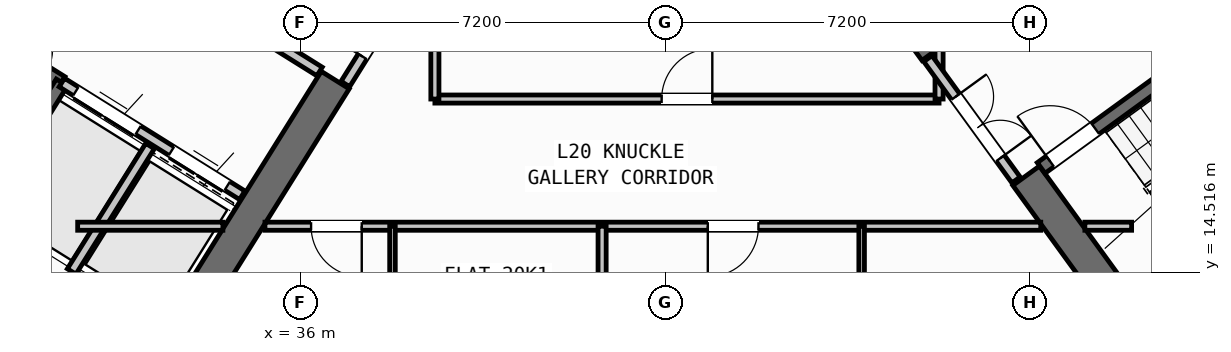
"""IFC4 building model, lengths in metres.
Left out: names, types, materials, properties, quantities, classifications, styles, units other than length and angle.
Written with IfcOpenShell. Run it as: python <this file> out.ifc"""

import sys

from ifc_helpers import new_model, si_unit, direction, frame, frame_2d, origin, place, context, subcontext, project, spatial, rectangle, extrude, source, transform, mapped, element, fill, save


model = new_model("IFC4")
c1 = context("Model", 3, precision=1e-05, world=origin(), true_north=direction((0.0, 1.0)))
c2 = subcontext(c1, "Body", "Model", "MODEL_VIEW")
j1 = project(units=[si_unit("LENGTHUNIT", "METRE"), si_unit("PLANEANGLEUNIT", "RADIAN")], contexts=[c1])
p1 = place(None, origin())
s1 = spatial("IfcSite", under=j1, at=p1, CompositionType="ELEMENT")
p2 = place(p1, origin())
s2 = spatial("IfcBuilding", under=s1, at=p2, CompositionType="ELEMENT")
p3 = place(p2, frame((0.0, 0.0, 81.0)))
s3 = spatial("IfcBuildingStorey", under=s2, at=p3, CompositionType="ELEMENT", Elevation=81.0)
p4 = place(p3, frame((33.409, 12.45, 0.0), z_axis=(0.0, 0.0, 1.0), x_axis=(-0.848051132073, 0.529914405721, 0.0)))
e1 = element("IfcWall", 1, at=p4, inside=s3, PredefinedType="SHEAR", context=c2, shape_type="SweptSolid", body=[
    extrude(rectangle(XDim=13.24, YDim=0.65, at=frame_2d((6.62, 0.0))), origin(), (0.0, 0.0, 1.0), 3.32),
])
p5 = place(p3, frame((36.683, 18.304, 0.0), z_axis=(0.0, 0.0, 1.0), x_axis=(-0.529899109053, -0.848060690178, 0.0)))
e2 = element("IfcWall", 2, at=p5, inside=s3, PredefinedType="SHEAR", context=c2, shape_type="SweptSolid", body=[
    extrude(rectangle(XDim=6.375, YDim=0.65, at=frame_2d((3.188, 0.0))), origin(), (0.0, 0.0, 1.0), 3.32),
])
p6 = place(p3, frame((52.318, 13.11, 0.0), z_axis=(0.0, 0.0, 1.0), x_axis=(0.809019445368, 0.587781878776, 0.0)))
e3 = element("IfcWall", 3, at=p6, inside=s3, PredefinedType="SHEAR", context=c2, shape_type="SweptSolid", body=[
    extrude(rectangle(XDim=12.44, YDim=0.65, at=frame_2d((6.22, 0.0))), origin(), (0.0, 0.0, 1.0), 3.32),
])
p7 = place(p3, frame((52.39, 13.564, 0.0), z_axis=(0.0, 0.0, 1.0), x_axis=(-0.58779688989, 0.809008539037, 0.0)))
e4 = element("IfcWall", 4, at=p7, inside=s3, PredefinedType="SHEAR", context=c2, shape_type="SweptSolid", body=[
    extrude(rectangle(XDim=3.525, YDim=0.65, at=frame_2d((1.763, 0.0))), origin(), (0.0, 0.0, 1.0), 3.32),
])
p8 = place(p3, frame((48.526, 18.884, 0.0), z_axis=(0.0, 0.0, 1.0), x_axis=(-0.58777996584, 0.809020835181, 0.0)))
e5 = element("IfcWall", 5, at=p8, inside=s3, PredefinedType="SHEAR", context=c2, shape_type="SweptSolid", body=[
    extrude(rectangle(XDim=6.375, YDim=0.65, at=frame_2d((3.188, 0.0))), origin(), (0.0, 0.0, 1.0), 3.32),
])
p9 = place(p3, frame((31.76, 12.183, 0.0), z_axis=(0.0, 0.0, 1.0), x_axis=(-0.848047074256, 0.529920899612, 0.0)))
e6 = element("IfcWall", 6, at=p9, inside=s3, PredefinedType="STANDARD", context=c2, shape_type="SweptSolid", body=[
    extrude(rectangle(XDim=30.652, YDim=0.32, at=frame_2d((15.326, 0.0))), origin(), (0.0, 0.0, 1.0), 3.32),
])
p10 = place(p9, frame((14.878, 0.0, 0.0)))
e7 = element("IfcOpeningElement", 7, at=p10, cuts=e6, PredefinedType="OPENING", context=c2, shape_type="SweptSolid", body=[
    extrude(rectangle(XDim=1.2, YDim=2.15, at=frame_2d((0.6, 1.075))), frame((0.0, 0.17, 0.0), z_axis=(0.0, -1.0, 0.0), x_axis=(1.0, 0.0, 0.0)), (0.0, 0.0, 1.0), 0.34),
])
p11 = place(p9, frame((1.99, 0.0, 0.8)))
e8 = element("IfcOpeningElement", 8, at=p11, cuts=e6, PredefinedType="OPENING", context=c2, shape_type="SweptSolid", body=[
    extrude(rectangle(XDim=2.1, YDim=1.55, at=frame_2d((1.05, 0.775))), frame((0.0, 0.17, 0.0), z_axis=(0.0, -1.0, 0.0), x_axis=(1.0, 0.0, 0.0)), (0.0, 0.0, 1.0), 0.34),
])
p12 = place(p9, frame((7.169, 0.0, 0.8)))
e9 = element("IfcOpeningElement", 9, at=p12, cuts=e6, PredefinedType="OPENING", context=c2, shape_type="SweptSolid", body=[
    extrude(rectangle(XDim=2.1, YDim=1.55, at=frame_2d((1.05, 0.775))), frame((0.0, 0.17, 0.0), z_axis=(0.0, -1.0, 0.0), x_axis=(1.0, 0.0, 0.0)), (0.0, 0.0, 1.0), 0.34),
])
p13 = place(p9, frame((21.289, 0.0, 0.85)))
e10 = element("IfcOpeningElement", 10, at=p13, cuts=e6, PredefinedType="OPENING", context=c2, shape_type="SweptSolid", body=[
    extrude(rectangle(XDim=1.5, YDim=1.5, at=frame_2d((0.75, 0.75))), frame((0.0, 0.17, 0.0), z_axis=(0.0, -1.0, 0.0), x_axis=(1.0, 0.0, 0.0)), (0.0, 0.0, 1.0), 0.34),
])
p14 = place(p9, frame((25.59, 0.0, 1.0)))
e11 = element("IfcOpeningElement", 11, at=p14, cuts=e6, PredefinedType="OPENING", context=c2, shape_type="SweptSolid", body=[
    extrude(rectangle(XDim=0.9, YDim=1.25, at=frame_2d((0.45, 0.625))), frame((0.0, 0.17, 0.0), z_axis=(0.0, -1.0, 0.0), x_axis=(1.0, 0.0, 0.0)), (0.0, 0.0, 1.0), 0.34),
])
p15 = place(p9, frame((28.47, 0.0, 1.0)))
e12 = element("IfcOpeningElement", 12, at=p15, cuts=e6, PredefinedType="OPENING", context=c2, shape_type="SweptSolid", body=[
    extrude(rectangle(XDim=0.9, YDim=1.25, at=frame_2d((0.45, 0.625))), frame((0.0, 0.17, 0.0), z_axis=(0.0, -1.0, 0.0), x_axis=(1.0, 0.0, 0.0)), (0.0, 0.0, 1.0), 0.34),
])
p16 = place(p3, frame((31.28, 18.261, 0.0), z_axis=(0.0, 0.0, 1.0), x_axis=(-0.848051618787, 0.529913626805, 0.0)))
e13 = element("IfcWall", 13, at=p16, inside=s3, PredefinedType="SHEAR", context=c2, shape_type="SweptSolid", body=[
    extrude(rectangle(XDim=7.46, YDim=0.26, at=frame_2d((3.73, 0.0))), origin(), (0.0, 0.0, 1.0), 3.32),
])
p17 = place(p16, frame((0.36, 0.0, 0.0)))
e14 = element("IfcOpeningElement", 14, at=p17, cuts=e13, PredefinedType="OPENING", context=c2, shape_type="SweptSolid", body=[
    extrude(rectangle(XDim=0.86, YDim=2.05, at=frame_2d((0.43, 1.025))), frame((0.0, 0.14, 0.0), z_axis=(0.0, -1.0, 0.0), x_axis=(1.0, 0.0, 0.0)), (0.0, 0.0, 1.0), 0.28),
])
p18 = place(p3, frame((31.288, 18.256, 0.0), z_axis=(0.0, 0.0, 1.0), x_axis=(-0.529943379326, -0.848033026897, 0.0)))
e15 = element("IfcWall", 15, at=p18, inside=s3, PredefinedType="SHEAR", context=c2, shape_type="SweptSolid", body=[
    extrude(rectangle(XDim=3.16, YDim=0.26, at=frame_2d((1.58, 0.0))), origin(), (0.0, 0.0, 1.0), 3.32),
])
p19 = place(p3, frame((34.848, 16.031, 0.0), z_axis=(0.0, 0.0, 1.0), x_axis=(-0.848044042236, 0.529925751807, 0.0)))
e16 = element("IfcWall", 16, at=p19, inside=s3, PredefinedType="STANDARD", context=c2, shape_type="SweptSolid", body=[
    extrude(rectangle(XDim=4.198, YDim=0.2, at=frame_2d((2.099, 0.0))), origin(), (0.0, 0.0, 1.0), 3.31),
])
p20 = place(p19, frame((0.348, 0.0, 0.0)))
e17 = element("IfcOpeningElement", 17, at=p20, cuts=e16, PredefinedType="OPENING", context=c2, shape_type="SweptSolid", body=[
    extrude(rectangle(XDim=1.3, YDim=2.2, at=frame_2d((0.65, 1.1))), frame((0.0, 0.11, 0.0), z_axis=(0.0, -1.0, 0.0), x_axis=(1.0, 0.0, 0.0)), (0.0, 0.0, 1.0), 0.22),
])
p21 = place(p19, frame((2.423, 0.0, 0.0)))
e18 = element("IfcOpeningElement", 18, at=p21, cuts=e16, PredefinedType="OPENING", context=c2, shape_type="SweptSolid", body=[
    extrude(rectangle(XDim=1.45, YDim=2.25, at=frame_2d((0.725, 1.125))), frame((0.0, 0.11, 0.0), z_axis=(0.0, -1.0, 0.0), x_axis=(1.0, 0.0, 0.0)), (0.0, 0.0, 1.0), 0.22),
])
p22 = place(p3, frame((36.374, 18.474, 0.0), z_axis=(0.0, 0.0, 1.0), x_axis=(-0.848051071577, 0.529914502535, 0.0)))
e19 = element("IfcWall", 19, at=p22, inside=s3, PredefinedType="STANDARD", context=c2, shape_type="SweptSolid", body=[
    extrude(rectangle(XDim=5.718, YDim=0.2, at=frame_2d((2.859, 0.0))), origin(), (0.0, 0.0, 1.0), 3.31),
])
p23 = place(p22, frame((2.498, 0.0, 0.0)))
e20 = element("IfcOpeningElement", 20, at=p23, cuts=e19, PredefinedType="OPENING", context=c2, shape_type="SweptSolid", body=[
    extrude(rectangle(XDim=1.15, YDim=2.1, at=frame_2d((0.575, 1.05))), frame((0.0, 0.11, 0.0), z_axis=(0.0, -1.0, 0.0), x_axis=(1.0, 0.0, 0.0)), (0.0, 0.0, 1.0), 0.22),
])
p24 = place(p3, frame((33.029, 17.003, 0.0), z_axis=(0.0, 0.0, 1.0), x_axis=(-0.529916267533, -0.848049968695, 0.0)))
e21 = element("IfcWall", 21, at=p24, inside=s3, PredefinedType="STANDARD", context=c2, shape_type="SweptSolid", body=[
    extrude(rectangle(XDim=2.92, YDim=0.2, at=frame_2d((1.46, 0.0))), origin(), (0.0, 0.0, 1.0), 3.31),
])
p25 = place(p3, frame((52.472, 14.013, 0.0), z_axis=(0.0, 0.0, 1.0), x_axis=(0.809028366311, 0.587769599847, 0.0)))
e22 = element("IfcWall", 22, at=p25, inside=s3, PredefinedType="SHEAR", context=c2, shape_type="SweptSolid", body=[
    extrude(rectangle(XDim=7.33, YDim=0.26, at=frame_2d((3.665, 0.0))), origin(), (0.0, 0.0, 1.0), 3.32),
])
p26 = place(p3, frame((50.615, 16.57, 0.0), z_axis=(0.0, 0.0, 1.0), x_axis=(0.809028366311, 0.587769599847, 0.0)))
e23 = element("IfcWall", 23, at=p26, inside=s3, PredefinedType="SHEAR", context=c2, shape_type="SweptSolid", body=[
    extrude(rectangle(XDim=7.33, YDim=0.26, at=frame_2d((3.665, 0.0))), origin(), (0.0, 0.0, 1.0), 3.32),
])
p27 = place(p26, frame((0.22, 0.0, 0.0)))
e24 = element("IfcOpeningElement", 24, at=p27, cuts=e23, PredefinedType="OPENING", context=c2, shape_type="SweptSolid", body=[
    extrude(rectangle(XDim=1.1, YDim=2.1, at=frame_2d((0.55, 1.05))), frame((0.0, 0.14, 0.0), z_axis=(0.0, -1.0, 0.0), x_axis=(1.0, 0.0, 0.0)), (0.0, 0.0, 1.0), 0.28),
])
p28 = place(p3, frame((38.451, 20.737, 0.0), z_axis=(0.0, 0.0, 1.0), x_axis=(-0.529924799939, -0.848044637038, 0.0)))
e25 = element("IfcWall", 25, at=p28, inside=s3, PredefinedType="STANDARD", context=c2, shape_type="SweptSolid", body=[
    extrude(rectangle(XDim=2.96, YDim=0.2, at=frame_2d((1.48, 0.0))), origin(), (0.0, 0.0, 1.0), 3.31),
])
p29 = place(p28, frame((1.46, 0.0, 0.0)))
e26 = element("IfcOpeningElement", 26, at=p29, cuts=e25, PredefinedType="OPENING", context=c2, shape_type="SweptSolid", body=[
    extrude(rectangle(XDim=0.86, YDim=2.05, at=frame_2d((0.43, 1.025))), frame((0.0, 0.11, 0.0), z_axis=(0.0, -1.0, 0.0), x_axis=(1.0, 0.0, 0.0)), (0.0, 0.0, 1.0), 0.22),
])
p30 = place(p3, frame((31.6, 15.42, 0.0), z_axis=(0.0, 0.0, 1.0), x_axis=(1.0, 0.0, 0.0)))
e27 = element("IfcWall", 27, at=p30, inside=s3, PredefinedType="PARTITIONING", context=c2, shape_type="SweptSolid", body=[
    extrude(rectangle(XDim=2.866, YDim=0.16, at=frame_2d((1.433, 0.0))), origin(), (0.0, 0.0, 1.0), 3.31),
])
p31 = place(p3, frame((35.296, 15.42, 0.0), z_axis=(0.0, 0.0, 1.0), x_axis=(1.0, 0.0, 0.0)))
e28 = element("IfcWall", 28, at=p31, inside=s3, PredefinedType="PARTITIONING", context=c2, shape_type="SweptSolid", body=[
    extrude(rectangle(XDim=15.311, YDim=0.16, at=frame_2d((7.655, 0.0))), origin(), (0.0, 0.0, 1.0), 3.31),
])
p32 = place(p31, frame((0.91, 0.0, 0.0)))
e29 = element("IfcOpeningElement", 29, at=p32, cuts=e28, PredefinedType="OPENING", context=c2, shape_type="SweptSolid", body=[
    extrude(rectangle(XDim=1.0, YDim=2.1, at=frame_2d((0.5, 1.05))), frame((0.0, 0.09, 0.0), z_axis=(0.0, -1.0, 0.0), x_axis=(1.0, 0.0, 0.0)), (0.0, 0.0, 1.0), 0.18),
])
p33 = place(p31, frame((8.74, 0.0, 0.0)))
e30 = element("IfcOpeningElement", 30, at=p33, cuts=e28, PredefinedType="OPENING", context=c2, shape_type="SweptSolid", body=[
    extrude(rectangle(XDim=1.0, YDim=2.1, at=frame_2d((0.5, 1.05))), frame((0.0, 0.09, 0.0), z_axis=(0.0, -1.0, 0.0), x_axis=(1.0, 0.0, 0.0)), (0.0, 0.0, 1.0), 0.18),
])
p34 = place(p3, frame((51.477, 15.42, 0.0), z_axis=(0.0, 0.0, 1.0), x_axis=(1.0, 0.0, 0.0)))
e31 = element("IfcWall", 31, at=p34, inside=s3, PredefinedType="PARTITIONING", context=c2, shape_type="SweptSolid", body=[
    extrude(rectangle(XDim=0.923, YDim=0.16, at=frame_2d((0.461, 0.0))), origin(), (0.0, 0.0, 1.0), 3.31),
])
p35 = place(p3, frame((38.65, 17.93, 0.0), z_axis=(0.0, 0.0, 1.0), x_axis=(1.0, 0.0, 0.0)))
e32 = element("IfcWall", 32, at=p35, inside=s3, PredefinedType="PARTITIONING", context=c2, shape_type="SweptSolid", body=[
    extrude(rectangle(XDim=9.95, YDim=0.16, at=frame_2d((4.975, 0.0))), origin(), (0.0, 0.0, 1.0), 3.31),
])
p36 = place(p35, frame((4.475, 0.0, 0.0)))
e33 = element("IfcOpeningElement", 33, at=p36, cuts=e32, PredefinedType="OPENING", context=c2, shape_type="SweptSolid", body=[
    extrude(rectangle(XDim=1.0, YDim=2.1, at=frame_2d((0.5, 1.05))), frame((0.0, 0.09, 0.0), z_axis=(0.0, -1.0, 0.0), x_axis=(1.0, 0.0, 0.0)), (0.0, 0.0, 1.0), 0.18),
])
p37 = place(p3, frame((38.65, 17.93, 0.0), z_axis=(0.0, 0.0, 1.0), x_axis=(0.0, 1.0, 0.0)))
e34 = element("IfcWall", 34, at=p37, inside=s3, PredefinedType="PARTITIONING", context=c2, shape_type="SweptSolid", body=[
    extrude(rectangle(XDim=2.857, YDim=0.16, at=frame_2d((1.428, 0.0))), origin(), (0.0, 0.0, 1.0), 3.31),
])
p38 = place(p3, frame((48.6, 17.93, 0.0), z_axis=(0.0, 0.0, 1.0), x_axis=(0.0, 1.0, 0.0)))
e35 = element("IfcWall", 35, at=p38, inside=s3, PredefinedType="PARTITIONING", context=c2, shape_type="SweptSolid", body=[
    extrude(rectangle(XDim=0.993, YDim=0.16, at=frame_2d((0.496, 0.0))), origin(), (0.0, 0.0, 1.0), 3.31),
])
p39 = place(p3, frame((50.119, 16.333, 0.0), z_axis=(0.0, 0.0, 1.0), x_axis=(-0.587749856981, 0.809042709391, 0.0)))
e36 = element("IfcWall", 36, at=p39, inside=s3, PredefinedType="STANDARD", context=c2, shape_type="SweptSolid", body=[
    extrude(rectangle(XDim=2.96, YDim=0.2, at=frame_2d((1.48, 0.0))), origin(), (0.0, 0.0, 1.0), 3.31),
])
p40 = place(p39, frame((0.53, 0.0, 0.0)))
e37 = element("IfcOpeningElement", 37, at=p40, cuts=e36, PredefinedType="OPENING", context=c2, shape_type="SweptSolid", body=[
    extrude(rectangle(XDim=1.5, YDim=2.15, at=frame_2d((0.75, 1.075))), frame((0.0, 0.11, 0.0), z_axis=(0.0, -1.0, 0.0), x_axis=(1.0, 0.0, 0.0)), (0.0, 0.0, 1.0), 0.22),
])
p41 = place(p3, frame((41.95, 1.96, 0.0), z_axis=(0.0, 0.0, 1.0), x_axis=(0.0, 1.0, 0.0)))
e38 = element("IfcWall", 38, at=p41, inside=s3, PredefinedType="PARTITIONING", context=c2, shape_type="SweptSolid", body=[
    extrude(rectangle(XDim=13.46, YDim=0.16, at=frame_2d((6.73, 0.0))), origin(), (0.0, 0.0, 1.0), 3.31),
])
p42 = place(p3, frame((37.813, 1.96, 0.0), z_axis=(0.0, 0.0, 1.0), x_axis=(0.0, 1.0, 0.0)))
e39 = element("IfcWall", 39, at=p42, inside=s3, PredefinedType="PARTITIONING", context=c2, shape_type="SweptSolid", body=[
    extrude(rectangle(XDim=13.46, YDim=0.11, at=frame_2d((6.73, 0.0))), origin(), (0.0, 0.0, 1.0), 3.31),
])
p43 = place(p42, frame((5.5, 0.0, 0.0)))
e40 = element("IfcOpeningElement", 40, at=p43, cuts=e39, PredefinedType="OPENING", context=c2, shape_type="SweptSolid", body=[
    extrude(rectangle(XDim=0.92, YDim=2.08, at=frame_2d((0.46, 1.04))), frame((0.0, 0.065, 0.0), z_axis=(0.0, -1.0, 0.0), x_axis=(1.0, 0.0, 0.0)), (0.0, 0.0, 1.0), 0.13),
])
p44 = place(p42, frame((10.67, 0.0, 0.0)))
e41 = element("IfcOpeningElement", 41, at=p44, cuts=e39, PredefinedType="OPENING", context=c2, shape_type="SweptSolid", body=[
    extrude(rectangle(XDim=0.88, YDim=2.08, at=frame_2d((0.44, 1.04))), frame((0.0, 0.065, 0.0), z_axis=(0.0, -1.0, 0.0), x_axis=(1.0, 0.0, 0.0)), (0.0, 0.0, 1.0), 0.13),
])
p45 = place(p3, frame((47.072, 1.96, 0.0), z_axis=(0.0, 0.0, 1.0), x_axis=(0.0, 1.0, 0.0)))
e42 = element("IfcWall", 42, at=p45, inside=s3, PredefinedType="PARTITIONING", context=c2, shape_type="SweptSolid", body=[
    extrude(rectangle(XDim=13.46, YDim=0.11, at=frame_2d((6.73, 0.0))), origin(), (0.0, 0.0, 1.0), 3.31),
])
p46 = place(p45, frame((6.6, 0.0, 0.0)))
e43 = element("IfcOpeningElement", 43, at=p46, cuts=e42, PredefinedType="OPENING", context=c2, shape_type="SweptSolid", body=[
    extrude(rectangle(XDim=0.92, YDim=2.08, at=frame_2d((0.46, 1.04))), frame((0.0, 0.065, 0.0), z_axis=(0.0, -1.0, 0.0), x_axis=(1.0, 0.0, 0.0)), (0.0, 0.0, 1.0), 0.13),
])
p47 = place(p45, frame((11.32, 0.0, 0.0)))
e44 = element("IfcOpeningElement", 44, at=p47, cuts=e42, PredefinedType="OPENING", context=c2, shape_type="SweptSolid", body=[
    extrude(rectangle(XDim=0.88, YDim=2.08, at=frame_2d((0.44, 1.04))), frame((0.0, 0.065, 0.0), z_axis=(0.0, -1.0, 0.0), x_axis=(1.0, 0.0, 0.0)), (0.0, 0.0, 1.0), 0.13),
])
m1 = source(origin(), c2, "Body", "SweptSolid", [
    extrude(rectangle(XDim=1.3, YDim=2.2, at=frame_2d((0.65, 1.1))), frame((0.0, 0.025, 0.0), z_axis=(0.0, -1.0, 0.0), x_axis=(1.0, 0.0, 0.0)), (0.0, 0.0, 1.0), 0.05),
])
p48 = place(p20, origin())
e45 = element("IfcDoor", 45, at=p48, inside=s3, OperationType="DOUBLE_DOOR_SLIDING", PredefinedType="DOOR", context=c2, shape_type="MappedRepresentation", body=[
    mapped(m1, transform((0.0, 0.0, 0.0), scale=1.0)),
])
fill(e17, e45)
m2 = source(origin(), c2, "Body", "SweptSolid", [
    extrude(rectangle(XDim=1.45, YDim=2.25, at=frame_2d((0.725, 1.125))), frame((0.0, 0.025, 0.0), z_axis=(0.0, -1.0, 0.0), x_axis=(1.0, 0.0, 0.0)), (0.0, 0.0, 1.0), 0.05),
])
p49 = place(p21, origin())
e46 = element("IfcDoor", 46, at=p49, inside=s3, OperationType="DOUBLE_DOOR_SLIDING", PredefinedType="DOOR", context=c2, shape_type="MappedRepresentation", body=[
    mapped(m2, transform((0.0, 0.0, 0.0), scale=1.0)),
])
fill(e18, e46)
m3 = source(origin(), c2, "Body", "SweptSolid", [
    extrude(rectangle(XDim=1.1, YDim=2.1, at=frame_2d((0.55, 1.05))), frame((0.0, 0.025, 0.0), z_axis=(0.0, -1.0, 0.0), x_axis=(1.0, 0.0, 0.0)), (0.0, 0.0, 1.0), 0.05),
])
p50 = place(p27, origin())
e47 = element("IfcDoor", 47, at=p50, inside=s3, OperationType="SINGLE_SWING_LEFT", PredefinedType="DOOR", context=c2, shape_type="MappedRepresentation", body=[
    mapped(m3, transform((0.0, 0.0, 0.0), scale=1.0)),
])
fill(e24, e47)
m4 = source(origin(), c2, "Body", "SweptSolid", [
    extrude(rectangle(XDim=1.0, YDim=2.1, at=frame_2d((0.5, 1.05))), frame((0.0, 0.025, 0.0), z_axis=(0.0, -1.0, 0.0), x_axis=(1.0, 0.0, 0.0)), (0.0, 0.0, 1.0), 0.05),
])
p51 = place(p36, origin())
e48 = element("IfcDoor", 48, at=p51, inside=s3, OperationType="SINGLE_SWING_RIGHT", PredefinedType="DOOR", context=c2, shape_type="MappedRepresentation", body=[
    mapped(m4, transform((0.0, 0.0, 0.0), scale=1.0)),
])
fill(e33, e48)
m5 = source(origin(), c2, "Body", "SweptSolid", [
    extrude(rectangle(XDim=0.86, YDim=2.05, at=frame_2d((0.43, 1.025))), frame((0.0, 0.025, 0.0), z_axis=(0.0, -1.0, 0.0), x_axis=(1.0, 0.0, 0.0)), (0.0, 0.0, 1.0), 0.05),
])
p52 = place(p29, frame((0.86, 0.0, 0.0), z_axis=(0.0, 0.0, 1.0), x_axis=(-1.0, 0.0, 0.0)))
e49 = element("IfcDoor", 49, at=p52, inside=s3, OperationType="SINGLE_SWING_LEFT", PredefinedType="DOOR", context=c2, shape_type="MappedRepresentation", body=[
    mapped(m5, transform((0.0, 0.0, 0.0), scale=1.0)),
])
fill(e26, e49)
m6 = source(origin(), c2, "Body", "SweptSolid", [
    extrude(rectangle(XDim=1.5, YDim=2.15, at=frame_2d((0.75, 1.075))), frame((0.0, 0.025, 0.0), z_axis=(0.0, -1.0, 0.0), x_axis=(1.0, 0.0, 0.0)), (0.0, 0.0, 1.0), 0.05),
])
p53 = place(p40, frame((1.5, 0.0, 0.0), z_axis=(0.0, 0.0, 1.0), x_axis=(-1.0, 0.0, 0.0)))
e50 = element("IfcDoor", 50, at=p53, inside=s3, OperationType="DOUBLE_DOOR_SINGLE_SWING", PredefinedType="DOOR", context=c2, shape_type="MappedRepresentation", body=[
    mapped(m6, transform((0.0, 0.0, 0.0), scale=1.0)),
])
fill(e37, e50)
p54 = place(p32, frame((1.0, 0.0, 0.0), z_axis=(0.0, 0.0, 1.0), x_axis=(-1.0, 0.0, 0.0)))
e51 = element("IfcDoor", 51, at=p54, inside=s3, OperationType="SINGLE_SWING_LEFT", PredefinedType="DOOR", context=c2, shape_type="MappedRepresentation", body=[
    mapped(m4, transform((0.0, 0.0, 0.0), scale=1.0)),
])
fill(e29, e51)
p55 = place(p33, frame((1.0, 0.0, 0.0), z_axis=(0.0, 0.0, 1.0), x_axis=(-1.0, 0.0, 0.0)))
e52 = element("IfcDoor", 52, at=p55, inside=s3, OperationType="SINGLE_SWING_RIGHT", PredefinedType="DOOR", context=c2, shape_type="MappedRepresentation", body=[
    mapped(m4, transform((0.0, 0.0, 0.0), scale=1.0)),
])
fill(e30, e52)
save(model, sys.argv[1])
